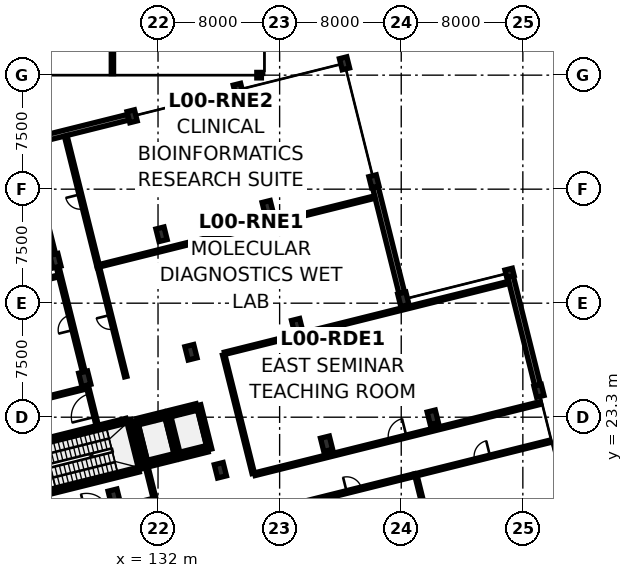
"""IFC4 building model, lengths in metres.
Left out: names, types, materials, properties, quantities, classifications, styles, units other than length and angle.
Written with IfcOpenShell. Run it as: python <this file> out.ifc"""

import sys

from ifc_helpers import new_model, si_unit, direction, frame, frame_2d, origin, origin_2d, place, context, subcontext, project, spatial, rectangle, i_section, extrude, element, fill, save


model = new_model("IFC4")
c1 = context("Model", 3, precision=1e-05, world=origin(), true_north=direction((0.0, 1.0)))
c2 = subcontext(c1, "Body", "Model", "MODEL_VIEW")
j1 = project(units=[si_unit("LENGTHUNIT", "METRE"), si_unit("PLANEANGLEUNIT", "RADIAN")], contexts=[c1])
p1 = place(None, origin())
s1 = spatial("IfcSite", under=j1, at=p1, CompositionType="ELEMENT")
p2 = place(p1, origin())
s2 = spatial("IfcBuilding", under=s1, at=p2, CompositionType="ELEMENT")
p3 = place(p2, origin())
s3 = spatial("IfcBuildingStorey", under=s2, at=p3, CompositionType="ELEMENT", Elevation=0.0)
for number, where, z_axis, x_axis in (
    (1, (129.115, 18.067, 0.0), (0.0, 0.0, 1.0), (0.97, 0.242, 0.0)),
    (2, (127.18, 25.829, 0.0), (0.0, 0.0, 1.0), (0.97, 0.242, 0.0)),
):
    element("IfcColumn", number, at=place(p3, frame(where, z_axis=z_axis, x_axis=x_axis)), inside=s3, PredefinedType="COLUMN", context=c2, shape_type="SweptSolid", body=[
        extrude(rectangle(XDim=0.6, YDim=0.9, at=origin_2d()), origin(), (0.0, 0.0, 1.0), 4.7),
    ])
p4 = place(p3, frame((125.245, 33.591, 0.0), z_axis=(0.0, 0.0, 1.0), x_axis=(0.970295726276, 0.2419218956, 0.0)))
e3 = element("IfcColumn", 3, at=p4, inside=s3, PredefinedType="COLUMN", context=c2, shape_type="SweptSolid", body=[
    extrude(rectangle(XDim=0.55, YDim=0.85, at=origin_2d()), origin(), (0.0, 0.0, 1.0), 4.7),
])
for number, where, z_axis, x_axis in (
    (4, (136.102, 19.808, 0.0), (0.0, 0.0, 1.0), (0.97, 0.242, 0.0)),
    (5, (134.166, 27.571, 0.0), (0.0, 0.0, 1.0), (0.97, 0.242, 0.0)),
):
    element("IfcColumn", number, at=place(p3, frame(where, z_axis=z_axis, x_axis=x_axis)), inside=s3, PredefinedType="COLUMN", context=c2, shape_type="SweptSolid", body=[
        extrude(rectangle(XDim=0.6, YDim=0.9, at=origin_2d()), origin(), (0.0, 0.0, 1.0), 4.7),
    ])
p5 = place(p3, frame((132.231, 35.333, 0.0), z_axis=(0.0, 0.0, 1.0), x_axis=(0.970295726276, 0.2419218956, 0.0)))
e6 = element("IfcColumn", 6, at=p5, inside=s3, PredefinedType="COLUMN", context=c2, shape_type="SweptSolid", body=[
    extrude(rectangle(XDim=0.55, YDim=0.85, at=origin_2d()), origin(), (0.0, 0.0, 1.0), 4.7),
])
p6 = place(p3, frame((130.295, 43.095, 0.0), z_axis=(0.0, 0.0, 1.0), x_axis=(0.970295726276, 0.2419218956, 0.0)))
e7 = element("IfcColumn", 7, at=p6, inside=s3, PredefinedType="COLUMN", context=c2, shape_type="SweptSolid", body=[
    extrude(rectangle(XDim=0.5, YDim=0.75, at=origin_2d()), origin(), (0.0, 0.0, 1.0), 4.7),
])
p7 = place(p3, frame((143.088, 21.55, 0.0), z_axis=(0.0, 0.0, 1.0), x_axis=(0.970295726276, 0.2419218956, 0.0)))
e8 = element("IfcColumn", 8, at=p7, inside=s3, PredefinedType="COLUMN", context=c2, shape_type="SweptSolid", body=[
    extrude(rectangle(XDim=0.6, YDim=0.9, at=origin_2d()), origin(), (0.0, 0.0, 1.0), 4.7),
])
for number, where, z_axis, x_axis in (
    (9, (141.152, 29.312, 0.0), (0.0, 0.0, 1.0), (0.97, 0.242, 0.0)),
    (10, (139.217, 37.075, 0.0), (0.0, 0.0, 1.0), (0.97, 0.242, 0.0)),
):
    element("IfcColumn", number, at=place(p3, frame(where, z_axis=z_axis, x_axis=x_axis)), inside=s3, PredefinedType="COLUMN", context=c2, shape_type="SweptSolid", body=[
        extrude(rectangle(XDim=0.55, YDim=0.85, at=origin_2d()), origin(), (0.0, 0.0, 1.0), 4.7),
    ])
p8 = place(p3, frame((137.281, 44.837, 0.0), z_axis=(0.0, 0.0, 1.0), x_axis=(0.970295726276, 0.2419218956, 0.0)))
e11 = element("IfcColumn", 11, at=p8, inside=s3, PredefinedType="COLUMN", context=c2, shape_type="SweptSolid", body=[
    extrude(rectangle(XDim=0.5, YDim=0.75, at=origin_2d()), origin(), (0.0, 0.0, 1.0), 4.7),
])
for number, where, z_axis, x_axis in (
    (12, (150.074, 23.292, 0.0), (0.0, 0.0, 1.0), (0.97, 0.242, 0.0)),
    (13, (148.138, 31.054, 0.0), (0.0, 0.0, 1.0), (0.97, 0.242, 0.0)),
):
    element("IfcColumn", number, at=place(p3, frame(where, z_axis=z_axis, x_axis=x_axis)), inside=s3, PredefinedType="COLUMN", context=c2, shape_type="SweptSolid", body=[
        extrude(rectangle(XDim=0.55, YDim=0.85, at=origin_2d()), origin(), (0.0, 0.0, 1.0), 4.7),
    ])
for number, where, z_axis, x_axis in (
    (14, (146.203, 38.817, 0.0), (0.0, 0.0, 1.0), (0.97, 0.242, 0.0)),
    (15, (144.268, 46.579, 0.0), (0.0, 0.0, 1.0), (0.97, 0.242, 0.0)),
    (16, (157.06, 25.034, 0.0), (0.0, 0.0, 1.0), (0.97, 0.242, 0.0)),
):
    element("IfcColumn", number, at=place(p3, frame(where, z_axis=z_axis, x_axis=x_axis)), inside=s3, PredefinedType="COLUMN", context=c2, shape_type="SweptSolid", body=[
        extrude(rectangle(XDim=0.5, YDim=0.75, at=origin_2d()), origin(), (0.0, 0.0, 1.0), 4.7),
    ])
p9 = place(p3, frame((155.125, 32.796, 0.0), z_axis=(0.0, 0.0, 1.0), x_axis=(0.970295726276, 0.2419218956, 0.0)))
e17 = element("IfcColumn", 17, at=p9, inside=s3, PredefinedType="COLUMN", context=c2, shape_type="SweptSolid", body=[
    extrude(rectangle(XDim=0.5, YDim=0.5, at=origin_2d()), origin(), (0.0, 0.0, 1.0), 6.096),
])
p10 = place(p3, frame((138.65, 45.8, 0.0), z_axis=(0.0, 0.0, 1.0), x_axis=(1.0, 0.0, 0.0)))
e18 = element("IfcColumn", 18, at=p10, inside=s3, PredefinedType="COLUMN", context=c2, shape_type="SweptSolid", body=[
    extrude(i_section(OverallWidth=0.3, OverallDepth=0.36, WebThickness=0.012, FlangeThickness=0.022, FilletRadius=0.027, at=origin_2d()), origin(), (0.0, 0.0, 1.0), 4.735),
])
p11 = place(p3, frame((155.185, 32.554, 0.0), z_axis=(0.0, 0.0, 1.0), x_axis=(0.241920240952, -0.970296138825, 0.0)))
e19 = element("IfcWall", 19, at=p11, inside=s3, PredefinedType="SOLIDWALL", context=c2, shape_type="SweptSolid", body=[
    extrude(rectangle(XDim=7.375, YDim=0.38, at=frame_2d((3.688, 0.0))), origin(), (0.0, 0.0, 1.0), 3.985),
])
p12 = place(p3, frame((123.552, 41.414, 0.0), z_axis=(0.0, 0.0, 1.0), x_axis=(0.970296633454, 0.241918257079, 0.0)))
e20 = element("IfcWall", 20, at=p12, inside=s3, PredefinedType="SOLIDWALL", context=c2, shape_type="SweptSolid", body=[
    extrude(rectangle(XDim=6.7, YDim=0.38, at=frame_2d((3.35, 0.0))), origin(), (0.0, 0.0, 1.0), 3.885),
])
p13 = place(p3, frame((146.294, 38.453, 0.0), z_axis=(0.0, 0.0, 1.0), x_axis=(0.241937193493, -0.970291911955, 0.0)))
e21 = element("IfcWall", 21, at=p13, inside=s3, PredefinedType="SOLIDWALL", context=c2, shape_type="SweptSolid", body=[
    extrude(rectangle(XDim=7.2, YDim=0.38, at=frame_2d((3.6, 0.0))), origin(), (0.0, 0.0, 1.0), 3.985),
])
p14 = place(p3, frame((123.75, 18.11, 0.0), z_axis=(0.0, 0.0, 1.0), x_axis=(0.970294108333, 0.241928384724, 0.0)))
e22 = element("IfcWall", 22, at=p14, inside=s3, PredefinedType="SHEAR", context=c2, shape_type="SweptSolid", body=[
    extrude(rectangle(XDim=7.19, YDim=0.32, at=frame_2d((3.595, 0.0))), origin(), (0.0, 0.0, 1.0), 4.7),
])
p15 = place(p3, frame((130.887, 19.889, 0.0), z_axis=(0.0, 0.0, 1.0), x_axis=(-0.241947258837, 0.970289402158, 0.0)))
e23 = element("IfcWall", 23, at=p15, inside=s3, PredefinedType="SHEAR", context=c2, shape_type="SweptSolid", body=[
    extrude(rectangle(XDim=3.32, YDim=0.32, at=frame_2d((1.66, 0.0))), origin(), (0.0, 0.0, 1.0), 4.7),
])
p16 = place(p3, frame((129.924, 23.071, 0.0), z_axis=(0.0, 0.0, 1.0), x_axis=(-0.970294108333, -0.241928384724, 0.0)))
e24 = element("IfcWall", 24, at=p16, inside=s3, PredefinedType="SHEAR", context=c2, shape_type="SweptSolid", body=[
    extrude(rectangle(XDim=7.19, YDim=0.32, at=frame_2d((3.595, 0.0))), origin(), (0.0, 0.0, 1.0), 4.7),
])
p17 = place(p3, frame((131.363, 20.176, 0.0), z_axis=(0.0, 0.0, 1.0), x_axis=(0.970284587517, 0.241966566341, 0.0)))
e25 = element("IfcWall", 25, at=p17, inside=s3, PredefinedType="SHEAR", context=c2, shape_type="SweptSolid", body=[
    extrude(rectangle(XDim=1.817, YDim=0.28, at=frame_2d((0.909, 0.0))), origin(), (0.0, 0.0, 1.0), 4.7),
])
p18 = place(p3, frame((133.267, 20.651, 0.0), z_axis=(0.0, 0.0, 1.0), x_axis=(-0.241921647353, 0.970295788171, 0.0)))
e26 = element("IfcWall", 26, at=p18, inside=s3, PredefinedType="SHEAR", context=c2, shape_type="SweptSolid", body=[
    extrude(rectangle(XDim=2.994, YDim=0.28, at=frame_2d((1.497, 0.0))), origin(), (0.0, 0.0, 1.0), 4.7),
])
p19 = place(p3, frame((132.402, 23.521, 0.0), z_axis=(0.0, 0.0, 1.0), x_axis=(-0.970284587517, -0.241966566341, 0.0)))
e27 = element("IfcWall", 27, at=p19, inside=s3, PredefinedType="SHEAR", context=c2, shape_type="SweptSolid", body=[
    extrude(rectangle(XDim=1.817, YDim=0.28, at=frame_2d((0.909, 0.0))), origin(), (0.0, 0.0, 1.0), 4.7),
])
p20 = place(p19, frame((0.259, 0.0, 0.0)))
e28 = element("IfcOpeningElement", 28, at=p20, cuts=e27, PredefinedType="OPENING", context=c2, shape_type="SweptSolid", body=[
    extrude(rectangle(XDim=1.3, YDim=2.2, at=frame_2d((0.65, 1.1))), frame((0.0, 0.152, 0.0), z_axis=(0.0, -1.0, 0.0), x_axis=(1.0, 0.0, 0.0)), (0.0, 0.0, 1.0), 0.304),
])
p21 = place(p3, frame((130.498, 23.046, 0.0), z_axis=(0.0, 0.0, 1.0), x_axis=(0.241921647353, -0.970295788171, 0.0)))
e29 = element("IfcWall", 29, at=p21, inside=s3, PredefinedType="SHEAR", context=c2, shape_type="SweptSolid", body=[
    extrude(rectangle(XDim=2.994, YDim=0.28, at=frame_2d((1.497, 0.0))), origin(), (0.0, 0.0, 1.0), 4.7),
])
p22 = place(p3, frame((133.408, 20.686, 0.0), z_axis=(0.0, 0.0, 1.0), x_axis=(0.970285190026, 0.241964150272, 0.0)))
e30 = element("IfcWall", 30, at=p22, inside=s3, PredefinedType="SHEAR", context=c2, shape_type="SweptSolid", body=[
    extrude(rectangle(XDim=1.91, YDim=0.28, at=frame_2d((0.955, 0.0))), origin(), (0.0, 0.0, 1.0), 4.7),
])
p23 = place(p3, frame((135.402, 21.183, 0.0), z_axis=(0.0, 0.0, 1.0), x_axis=(-0.241921647353, 0.970295788171, 0.0)))
e31 = element("IfcWall", 31, at=p23, inside=s3, PredefinedType="SHEAR", context=c2, shape_type="SweptSolid", body=[
    extrude(rectangle(XDim=2.994, YDim=0.28, at=frame_2d((1.497, 0.0))), origin(), (0.0, 0.0, 1.0), 4.7),
])
p24 = place(p3, frame((134.537, 24.053, 0.0), z_axis=(0.0, 0.0, 1.0), x_axis=(-0.970285190026, -0.241964150272, 0.0)))
e32 = element("IfcWall", 32, at=p24, inside=s3, PredefinedType="SHEAR", context=c2, shape_type="SweptSolid", body=[
    extrude(rectangle(XDim=1.91, YDim=0.28, at=frame_2d((0.955, 0.0))), origin(), (0.0, 0.0, 1.0), 4.7),
])
p25 = place(p24, frame((0.305, 0.0, 0.0)))
e33 = element("IfcOpeningElement", 33, at=p25, cuts=e32, PredefinedType="OPENING", context=c2, shape_type="SweptSolid", body=[
    extrude(rectangle(XDim=1.3, YDim=2.2, at=frame_2d((0.65, 1.1))), frame((0.0, 0.152, 0.0), z_axis=(0.0, -1.0, 0.0), x_axis=(1.0, 0.0, 0.0)), (0.0, 0.0, 1.0), 0.304),
])
p26 = place(p3, frame((127.995, 22.767, 0.0), z_axis=(0.0, 0.0, 1.0), x_axis=(-0.241877500256, 0.9703067942, 0.0)))
e34 = element("IfcWall", 34, at=p26, inside=s3, PredefinedType="PARTITIONING", context=c2, shape_type="SweptSolid", body=[
    extrude(rectangle(XDim=2.706, YDim=0.15, at=frame_2d((1.353, 0.0))), origin(), (0.0, 0.0, 1.0), 4.7),
])
p27 = place(p26, frame((0.573, 0.0, 0.0)))
e35 = element("IfcOpeningElement", 35, at=p27, cuts=e34, PredefinedType="OPENING", context=c2, shape_type="SweptSolid", body=[
    extrude(rectangle(XDim=1.56, YDim=2.3, at=frame_2d((0.78, 1.15))), frame((0.0, 0.087, 0.0), z_axis=(0.0, -1.0, 0.0), x_axis=(1.0, 0.0, 0.0)), (0.0, 0.0, 1.0), 0.174),
])
p28 = place(p3, frame((140.928, 17.508, 0.0), z_axis=(0.0, 0.0, 1.0), x_axis=(0.970293149657, 0.241932229621, 0.0)))
e36 = element("IfcWall", 36, at=p28, inside=s3, PredefinedType="PARTITIONING", context=c2, shape_type="SweptSolid", body=[
    extrude(rectangle(XDim=8.188, YDim=0.18, at=frame_2d((4.094, 0.0))), origin(), (0.0, 0.0, 1.0), 3.885),
])
p29 = place(p28, frame((3.594, 0.0, 0.0)))
e37 = element("IfcOpeningElement", 37, at=p29, cuts=e36, PredefinedType="OPENING", context=c2, shape_type="SweptSolid", body=[
    extrude(rectangle(XDim=1.0, YDim=2.15, at=frame_2d((0.5, 1.075))), frame((0.0, 0.102, 0.0), z_axis=(0.0, -1.0, 0.0), x_axis=(1.0, 0.0, 0.0)), (0.0, 0.0, 1.0), 0.204),
])
p30 = place(p3, frame((148.885, 19.491, 0.0), z_axis=(0.0, 0.0, 1.0), x_axis=(0.970294203895, 0.241928001454, 0.0)))
e38 = element("IfcWall", 38, at=p30, inside=s3, PredefinedType="PARTITIONING", context=c2, shape_type="SweptSolid", body=[
    extrude(rectangle(XDim=9.171, YDim=0.16, at=frame_2d((4.585, 0.0))), origin(), (0.0, 0.0, 1.0), 3.885),
])
p31 = place(p30, frame((4.061, 0.0, 0.0)))
e39 = element("IfcOpeningElement", 39, at=p31, cuts=e38, PredefinedType="OPENING", context=c2, shape_type="SweptSolid", body=[
    extrude(rectangle(XDim=1.05, YDim=2.15, at=frame_2d((0.525, 1.075))), frame((0.0, 0.092, 0.0), z_axis=(0.0, -1.0, 0.0), x_axis=(1.0, 0.0, 0.0)), (0.0, 0.0, 1.0), 0.184),
])
p32 = place(p3, frame((138.367, 19.549, 0.0), z_axis=(0.0, 0.0, 1.0), x_axis=(0.970295834183, 0.241921462809, 0.0)))
e40 = element("IfcWall", 40, at=p32, inside=s3, PredefinedType="PARTITIONING", context=c2, shape_type="SweptSolid", body=[
    extrude(rectangle(XDim=19.363, YDim=0.18, at=frame_2d((9.682, 0.0))), origin(), (0.0, 0.0, 1.0), 3.885),
])
p33 = place(p32, frame((9.082, 0.0, 0.0)))
e41 = element("IfcOpeningElement", 41, at=p33, cuts=e40, PredefinedType="OPENING", context=c2, shape_type="SweptSolid", body=[
    extrude(rectangle(XDim=1.2, YDim=2.15, at=frame_2d((0.6, 1.075))), frame((0.0, 0.102, 0.0), z_axis=(0.0, -1.0, 0.0), x_axis=(1.0, 0.0, 0.0)), (0.0, 0.0, 1.0), 0.204),
])
p34 = place(p3, frame((127.221, 25.87, 0.0), z_axis=(0.0, 0.0, 1.0), x_axis=(-0.241902639837, 0.970300527074, 0.0)))
e42 = element("IfcWall", 42, at=p34, inside=s3, PredefinedType="PARTITIONING", context=c2, shape_type="SweptSolid", body=[
    extrude(rectangle(XDim=7.533, YDim=0.18, at=frame_2d((3.767, 0.0))), origin(), (0.0, 0.0, 1.0), 3.885),
])
p35 = place(p34, frame((3.267, 0.0, 0.0)))
e43 = element("IfcOpeningElement", 43, at=p35, cuts=e42, PredefinedType="OPENING", context=c2, shape_type="SweptSolid", body=[
    extrude(rectangle(XDim=1.0, YDim=2.22, at=frame_2d((0.5, 1.11))), frame((0.0, 0.102, 0.0), z_axis=(0.0, -1.0, 0.0), x_axis=(1.0, 0.0, 0.0)), (0.0, 0.0, 1.0), 0.204),
])
p36 = place(p3, frame((129.876, 25.97, 0.0), z_axis=(0.0, 0.0, 1.0), x_axis=(-0.241938716353, 0.970291532236, 0.0)))
e44 = element("IfcWall", 44, at=p36, inside=s3, PredefinedType="PARTITIONING", context=c2, shape_type="SweptSolid", body=[
    extrude(rectangle(XDim=7.411, YDim=0.15, at=frame_2d((3.706, 0.0))), origin(), (0.0, 0.0, 1.0), 3.985),
])
p37 = place(p36, frame((3.23, 0.0, 0.0)))
e45 = element("IfcOpeningElement", 45, at=p37, cuts=e44, PredefinedType="OPENING", context=c2, shape_type="SweptSolid", body=[
    extrude(rectangle(XDim=0.95, YDim=2.15, at=frame_2d((0.475, 1.075))), frame((0.0, 0.087, 0.0), z_axis=(0.0, -1.0, 0.0), x_axis=(1.0, 0.0, 0.0)), (0.0, 0.0, 1.0), 0.174),
])
p38 = place(p3, frame((125.28, 33.657, 0.0), z_axis=(0.0, 0.0, 1.0), x_axis=(-0.241913572398, 0.970297801445, 0.0)))
e46 = element("IfcWall", 46, at=p38, inside=s3, PredefinedType="PARTITIONING", context=c2, shape_type="SweptSolid", body=[
    extrude(rectangle(XDim=7.573, YDim=0.15, at=frame_2d((3.787, 0.0))), origin(), (0.0, 0.0, 1.0), 3.885),
])
p39 = place(p38, frame((3.326, 0.0, 0.0)))
e47 = element("IfcOpeningElement", 47, at=p39, cuts=e46, PredefinedType="OPENING", context=c2, shape_type="SweptSolid", body=[
    extrude(rectangle(XDim=0.92, YDim=2.1, at=frame_2d((0.46, 1.05))), frame((0.0, 0.087, 0.0), z_axis=(0.0, -1.0, 0.0), x_axis=(1.0, 0.0, 0.0)), (0.0, 0.0, 1.0), 0.174),
])
p40 = place(p3, frame((128.08, 33.173, 0.0), z_axis=(0.0, 0.0, 1.0), x_axis=(-0.241908804898, 0.970298990061, 0.0)))
e48 = element("IfcWall", 48, at=p40, inside=s3, PredefinedType="PARTITIONING", context=c2, shape_type="SweptSolid", body=[
    extrude(rectangle(XDim=8.89, YDim=0.18, at=frame_2d((4.445, 0.0))), origin(), (0.0, 0.0, 1.0), 3.985),
])
p41 = place(p40, frame((3.955, 0.0, 0.0)))
e49 = element("IfcOpeningElement", 49, at=p41, cuts=e48, PredefinedType="OPENING", context=c2, shape_type="SweptSolid", body=[
    extrude(rectangle(XDim=0.98, YDim=2.12, at=frame_2d((0.49, 1.06))), frame((0.0, 0.102, 0.0), z_axis=(0.0, -1.0, 0.0), x_axis=(1.0, 0.0, 0.0)), (0.0, 0.0, 1.0), 0.204),
])
p42 = place(p3, frame((129.0, 45.902, 0.0), z_axis=(0.0, 0.0, 1.0), x_axis=(0.0, 1.0, 0.0)))
e50 = element("IfcWall", 50, at=p42, inside=s3, PredefinedType="PARTITIONING", context=c2, shape_type="SweptSolid", body=[
    extrude(rectangle(XDim=9.006, YDim=0.15, at=frame_2d((4.503, 0.0))), origin(), (0.0, 0.0, 1.0), 4.67),
])
p43 = place(p3, frame((131.763, 17.99, 0.0), z_axis=(0.0, 0.0, 1.0), x_axis=(-0.241962612769, 0.970285573438, 0.0)))
e51 = element("IfcWall", 51, at=p43, inside=s3, PredefinedType="PARTITIONING", context=c2, shape_type="SweptSolid", body=[
    extrude(rectangle(XDim=2.206, YDim=0.18, at=frame_2d((1.103, 0.0))), origin(), (0.0, 0.0, 1.0), 3.985),
])
p44 = place(p3, frame((120.535, 23.554, 0.0), z_axis=(0.0, 0.0, 1.0), x_axis=(0.970294973208, 0.241924915969, 0.0)))
e52 = element("IfcWall", 52, at=p44, inside=s3, PredefinedType="PARTITIONING", context=c2, shape_type="SweptSolid", body=[
    extrude(rectangle(XDim=6.961, YDim=0.16, at=frame_2d((3.48, 0.0))), origin(), (0.0, 0.0, 1.0), 3.985),
])
p45 = place(p3, frame((150.677, 12.605, 0.0), z_axis=(0.0, 0.0, 1.0), x_axis=(-0.241913935588, 0.970297710895, 0.0)))
e53 = element("IfcWall", 53, at=p45, inside=s3, PredefinedType="PARTITIONING", context=c2, shape_type="SweptSolid", body=[
    extrude(rectangle(XDim=7.023, YDim=0.15, at=frame_2d((3.511, 0.0))), origin(), (0.0, 0.0, 1.0), 3.985),
])
p46 = place(p3, frame((136.383, 27.505, 0.0), z_axis=(0.0, 0.0, 1.0), x_axis=(0.970295884672, 0.241921260307, 0.0)))
e54 = element("IfcWall", 54, at=p46, inside=s3, PredefinedType="PARTITIONING", context=c2, shape_type="SweptSolid", body=[
    extrude(rectangle(XDim=19.263, YDim=0.15, at=frame_2d((9.632, 0.0))), origin(), (0.0, 0.0, 1.0), 3.885),
])
p47 = place(p3, frame((138.264, 19.611, 0.0), z_axis=(0.0, 0.0, 1.0), x_axis=(-0.241920353256, 0.970296110824, 0.0)))
e55 = element("IfcWall", 55, at=p47, inside=s3, PredefinedType="PARTITIONING", context=c2, shape_type="SweptSolid", body=[
    extrude(rectangle(XDim=8.03, YDim=0.16, at=frame_2d((4.015, 0.0))), origin(), (0.0, 0.0, 1.0), 3.985),
])
p48 = place(p3, frame((118.604, 30.885, 0.0), z_axis=(0.0, 0.0, 1.0), x_axis=(0.970295173711, 0.241924111804, 0.0)))
e56 = element("IfcWall", 56, at=p48, inside=s3, PredefinedType="PARTITIONING", context=c2, shape_type="SweptSolid", body=[
    extrude(rectangle(XDim=7.046, YDim=0.125, at=frame_2d((3.523, 0.0))), origin(), (0.0, 0.0, 1.0), 3.885),
])
p49 = place(p3, frame((128.161, 33.268, 0.0), z_axis=(0.0, 0.0, 1.0), x_axis=(0.970294807235, 0.241925581644, 0.0)))
e57 = element("IfcWall", 57, at=p49, inside=s3, PredefinedType="PARTITIONING", context=c2, shape_type="SweptSolid", body=[
    extrude(rectangle(XDim=18.646, YDim=0.16, at=frame_2d((9.323, 0.0))), origin(), (0.0, 0.0, 1.0), 3.885),
])
p50 = place(p20, origin())
e58 = element("IfcDoor", 58, at=p50, inside=s3, OperationType="SLIDING_TO_LEFT", PredefinedType="DOOR", context=c2, shape_type="SweptSolid", body=[
    extrude(rectangle(XDim=1.3, YDim=2.2, at=frame_2d((0.65, 1.1))), frame((0.0, 0.025, 0.0), z_axis=(0.0, -1.0, 0.0), x_axis=(1.0, 0.0, 0.0)), (0.0, 0.0, 1.0), 0.05),
])
fill(e28, e58)
p51 = place(p25, origin())
e59 = element("IfcDoor", 59, at=p51, inside=s3, OperationType="SLIDING_TO_RIGHT", PredefinedType="DOOR", context=c2, shape_type="SweptSolid", body=[
    extrude(rectangle(XDim=1.3, YDim=2.2, at=frame_2d((0.65, 1.1))), frame((0.0, 0.025, 0.0), z_axis=(0.0, -1.0, 0.0), x_axis=(1.0, 0.0, 0.0)), (0.0, 0.0, 1.0), 0.05),
])
fill(e33, e59)
p52 = place(p27, origin())
e60 = element("IfcDoor", 60, at=p52, inside=s3, OperationType="SINGLE_SWING_LEFT", PredefinedType="DOOR", context=c2, shape_type="SweptSolid", body=[
    extrude(rectangle(XDim=1.56, YDim=2.3, at=frame_2d((0.78, 1.15))), frame((0.0, 0.025, 0.0), z_axis=(0.0, -1.0, 0.0), x_axis=(1.0, 0.0, 0.0)), (0.0, 0.0, 1.0), 0.05),
])
fill(e35, e60)
p53 = place(p29, origin())
e61 = element("IfcDoor", 61, at=p53, inside=s3, OperationType="SINGLE_SWING_LEFT", PredefinedType="DOOR", context=c2, shape_type="SweptSolid", body=[
    extrude(rectangle(XDim=1.0, YDim=2.15, at=frame_2d((0.5, 1.075))), frame((0.0, 0.025, 0.0), z_axis=(0.0, -1.0, 0.0), x_axis=(1.0, 0.0, 0.0)), (0.0, 0.0, 1.0), 0.05),
])
fill(e37, e61)
p54 = place(p31, origin())
e62 = element("IfcDoor", 62, at=p54, inside=s3, OperationType="SINGLE_SWING_RIGHT", PredefinedType="DOOR", context=c2, shape_type="SweptSolid", body=[
    extrude(rectangle(XDim=1.05, YDim=2.15, at=frame_2d((0.525, 1.075))), frame((0.0, 0.025, 0.0), z_axis=(0.0, -1.0, 0.0), x_axis=(1.0, 0.0, 0.0)), (0.0, 0.0, 1.0), 0.05),
])
fill(e39, e62)
p55 = place(p33, origin())
e63 = element("IfcDoor", 63, at=p55, inside=s3, OperationType="SINGLE_SWING_RIGHT", PredefinedType="DOOR", context=c2, shape_type="SweptSolid", body=[
    extrude(rectangle(XDim=1.2, YDim=2.15, at=frame_2d((0.6, 1.075))), frame((0.0, 0.025, 0.0), z_axis=(0.0, -1.0, 0.0), x_axis=(1.0, 0.0, 0.0)), (0.0, 0.0, 1.0), 0.05),
])
fill(e41, e63)
p56 = place(p35, origin())
e64 = element("IfcDoor", 64, at=p56, inside=s3, OperationType="SINGLE_SWING_LEFT", PredefinedType="DOOR", context=c2, shape_type="SweptSolid", body=[
    extrude(rectangle(XDim=1.0, YDim=2.22, at=frame_2d((0.5, 1.11))), frame((0.0, 0.025, 0.0), z_axis=(0.0, -1.0, 0.0), x_axis=(1.0, 0.0, 0.0)), (0.0, 0.0, 1.0), 0.05),
])
fill(e43, e64)
p57 = place(p37, origin())
e65 = element("IfcDoor", 65, at=p57, inside=s3, OperationType="SINGLE_SWING_RIGHT", PredefinedType="DOOR", context=c2, shape_type="SweptSolid", body=[
    extrude(rectangle(XDim=0.95, YDim=2.15, at=frame_2d((0.475, 1.075))), frame((0.0, 0.025, 0.0), z_axis=(0.0, -1.0, 0.0), x_axis=(1.0, 0.0, 0.0)), (0.0, 0.0, 1.0), 0.05),
])
fill(e45, e65)
p58 = place(p41, origin())
e66 = element("IfcDoor", 66, at=p58, inside=s3, OperationType="SINGLE_SWING_RIGHT", PredefinedType="DOOR", context=c2, shape_type="SweptSolid", body=[
    extrude(rectangle(XDim=0.98, YDim=2.12, at=frame_2d((0.49, 1.06))), frame((0.0, 0.025, 0.0), z_axis=(0.0, -1.0, 0.0), x_axis=(1.0, 0.0, 0.0)), (0.0, 0.0, 1.0), 0.05),
])
fill(e49, e66)
save(model, sys.argv[1])
